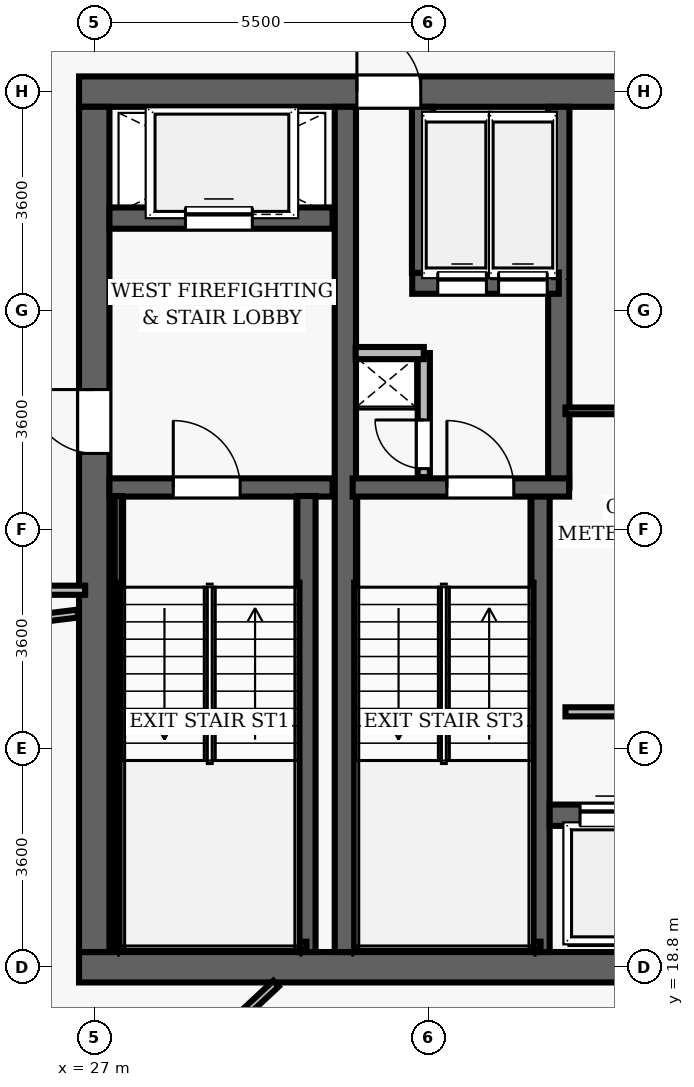
"""IFC4 building model, lengths in metres.
Left out: names, types, materials, properties, quantities, classifications, styles, units other than length and angle.
Written with IfcOpenShell. Run it as: python <this file> out.ifc"""

import sys

from ifc_helpers import new_model, si_unit, direction, frame, frame_2d, origin, place, context, subcontext, project, spatial, rectangle, extrude, element, fill, save


model = new_model("IFC4")
c1 = context("Model", 3, precision=1e-05, world=origin(), true_north=direction((0.0, 1.0)))
c2 = subcontext(c1, "Body", "Model", "MODEL_VIEW")
j1 = project(units=[si_unit("LENGTHUNIT", "METRE"), si_unit("PLANEANGLEUNIT", "RADIAN")], contexts=[c1])
p1 = place(None, origin())
s1 = spatial("IfcSite", under=j1, at=p1, CompositionType="ELEMENT")
p2 = place(p1, origin())
s2 = spatial("IfcBuilding", under=s1, at=p2, CompositionType="ELEMENT")
p3 = place(p2, frame((0.0, 0.0, 213.55)))
s3 = spatial("IfcBuildingStorey", under=s2, at=p3, CompositionType="ELEMENT", Elevation=213.55)
p4 = place(p3, frame((26.75, 18.8, 0.0), z_axis=(0.0, 0.0, 1.0), x_axis=(1.0, 0.0, 0.0)))
e1 = element("IfcWall", 1, at=p4, inside=s3, PredefinedType="SHEAR", context=c2, shape_type="SweptSolid", body=[
    extrude(rectangle(XDim=22.5, YDim=0.5, at=frame_2d((11.25, 0.0))), origin(), (0.0, 0.0, 1.0), 3.85),
])
p5 = place(p4, frame((14.47, 0.0, 0.0)))
e2 = element("IfcOpeningElement", 2, at=p5, cuts=e1, PredefinedType="OPENING", context=c2, shape_type="SweptSolid", body=[
    extrude(rectangle(XDim=1.05, YDim=2.15, at=frame_2d((0.525, 1.075))), frame((0.0, 0.26, 0.0), z_axis=(0.0, -1.0, 0.0), x_axis=(1.0, 0.0, 0.0)), (0.0, 0.0, 1.0), 0.52),
])
p6 = place(p3, frame((26.75, 33.2, 0.0), z_axis=(0.0, 0.0, 1.0), x_axis=(1.0, 0.0, 0.0)))
e3 = element("IfcWall", 3, at=p6, inside=s3, PredefinedType="SHEAR", context=c2, shape_type="SweptSolid", body=[
    extrude(rectangle(XDim=22.5, YDim=0.5, at=frame_2d((11.25, 0.0))), origin(), (0.0, 0.0, 1.0), 3.85),
])
p7 = place(p6, frame((4.57, 0.0, 0.0)))
e4 = element("IfcOpeningElement", 4, at=p7, cuts=e3, PredefinedType="OPENING", context=c2, shape_type="SweptSolid", body=[
    extrude(rectangle(XDim=1.05, YDim=2.15, at=frame_2d((0.525, 1.075))), frame((0.0, 0.26, 0.0), z_axis=(0.0, -1.0, 0.0), x_axis=(1.0, 0.0, 0.0)), (0.0, 0.0, 1.0), 0.52),
])
p8 = place(p6, frame((14.47, 0.0, 0.0)))
e5 = element("IfcOpeningElement", 5, at=p8, cuts=e3, PredefinedType="OPENING", context=c2, shape_type="SweptSolid", body=[
    extrude(rectangle(XDim=1.05, YDim=2.15, at=frame_2d((0.525, 1.075))), frame((0.0, 0.26, 0.0), z_axis=(0.0, -1.0, 0.0), x_axis=(1.0, 0.0, 0.0)), (0.0, 0.0, 1.0), 0.52),
])
p9 = place(p3, frame((27.0, 19.05, 0.0), z_axis=(0.0, 0.0, 1.0), x_axis=(0.0, 1.0, 0.0)))
e6 = element("IfcWall", 6, at=p9, inside=s3, PredefinedType="SHEAR", context=c2, shape_type="SweptSolid", body=[
    extrude(rectangle(XDim=13.9, YDim=0.5, at=frame_2d((6.95, 0.0))), origin(), (0.0, 0.0, 1.0), 3.85),
])
p10 = place(p9, frame((8.2, 0.0, 0.0)))
e7 = element("IfcOpeningElement", 7, at=p10, cuts=e6, PredefinedType="OPENING", context=c2, shape_type="SweptSolid", body=[
    extrude(rectangle(XDim=1.05, YDim=2.15, at=frame_2d((0.525, 1.075))), frame((0.0, 0.26, 0.0), z_axis=(0.0, -1.0, 0.0), x_axis=(1.0, 0.0, 0.0)), (0.0, 0.0, 1.0), 0.52),
])
p11 = place(p3, frame((31.13, 19.05, 0.0), z_axis=(0.0, 0.0, 1.0), x_axis=(0.0, 1.0, 0.0)))
e8 = element("IfcWall", 8, at=p11, inside=s3, PredefinedType="SHEAR", context=c2, shape_type="SweptSolid", body=[
    extrude(rectangle(XDim=13.9, YDim=0.35, at=frame_2d((6.95, 0.0))), origin(), (0.0, 0.0, 1.0), 3.85),
])
p12 = place(p3, frame((27.25, 26.69, 0.0), z_axis=(0.0, 0.0, 1.0), x_axis=(1.0, 0.0, 0.0)))
e9 = element("IfcWall", 9, at=p12, inside=s3, PredefinedType="SHEAR", context=c2, shape_type="SweptSolid", body=[
    extrude(rectangle(XDim=3.67, YDim=0.3, at=frame_2d((1.835, 0.0))), origin(), (0.0, 0.0, 1.0), 3.85),
])
p13 = place(p12, frame((1.05, 0.0, 0.0)))
e10 = element("IfcOpeningElement", 10, at=p13, cuts=e9, PredefinedType="OPENING", context=c2, shape_type="SweptSolid", body=[
    extrude(rectangle(XDim=1.1, YDim=2.15, at=frame_2d((0.55, 1.075))), frame((0.0, 0.16, 0.0), z_axis=(0.0, -1.0, 0.0), x_axis=(1.0, 0.0, 0.0)), (0.0, 0.0, 1.0), 0.32),
])
p14 = place(p3, frame((30.49, 19.05, 0.0), z_axis=(0.0, 0.0, 1.0), x_axis=(0.0, 1.0, 0.0)))
e11 = element("IfcWall", 11, at=p14, inside=s3, PredefinedType="SHEAR", context=c2, shape_type="SweptSolid", body=[
    extrude(rectangle(XDim=7.5, YDim=0.3, at=frame_2d((3.75, 0.0))), origin(), (0.0, 0.0, 1.0), 3.85),
])
p15 = place(p3, frame((27.395, 19.1, 0.0), z_axis=(0.0, 0.0, 1.0), x_axis=(0.0, 1.0, 0.0)))
e12 = element("IfcWall", 12, at=p15, inside=s3, PredefinedType="SHEAR", context=c2, shape_type="SweptSolid", body=[
    extrude(rectangle(XDim=7.45, YDim=0.12, at=frame_2d((3.725, 0.0))), origin(), (0.0, 0.0, 1.0), 3.85),
])
p16 = place(p3, frame((27.395, 19.16, 0.0), z_axis=(0.0, 0.0, 1.0), x_axis=(1.0, 0.0, 0.0)))
e13 = element("IfcWall", 13, at=p16, inside=s3, PredefinedType="SHEAR", context=c2, shape_type="SweptSolid", body=[
    extrude(rectangle(XDim=3.095, YDim=0.12, at=frame_2d((1.547, 0.0))), origin(), (0.0, 0.0, 1.0), 3.85),
])
p17 = place(p3, frame((27.25, 31.12, 0.0), z_axis=(0.0, 0.0, 1.0), x_axis=(1.0, 0.0, 0.0)))
e14 = element("IfcWall", 14, at=p17, inside=s3, PredefinedType="SHEAR", context=c2, shape_type="SweptSolid", body=[
    extrude(rectangle(XDim=3.67, YDim=0.35, at=frame_2d((1.835, 0.0))), origin(), (0.0, 0.0, 1.0), 3.035),
])
p18 = place(p17, frame((1.25, 0.0, 0.0)))
e15 = element("IfcOpeningElement", 15, at=p18, cuts=e14, PredefinedType="OPENING", context=c2, shape_type="SweptSolid", body=[
    extrude(rectangle(XDim=1.1, YDim=2.15, at=frame_2d((0.55, 1.075))), frame((0.0, 0.185, 0.0), z_axis=(0.0, -1.0, 0.0), x_axis=(1.0, 0.0, 0.0)), (0.0, 0.0, 1.0), 0.37),
])
p19 = place(p3, frame((34.34, 19.05, 0.0), z_axis=(0.0, 0.0, 1.0), x_axis=(0.0, 1.0, 0.0)))
e16 = element("IfcWall", 16, at=p19, inside=s3, PredefinedType="SHEAR", context=c2, shape_type="SweptSolid", body=[
    extrude(rectangle(XDim=7.5, YDim=0.3, at=frame_2d((3.75, 0.0))), origin(), (0.0, 0.0, 1.0), 3.85),
])
p20 = place(p3, frame((34.64, 26.69, 0.0), z_axis=(0.0, 0.0, 1.0), x_axis=(0.0, 1.0, 0.0)))
e17 = element("IfcWall", 17, at=p20, inside=s3, PredefinedType="SHEAR", context=c2, shape_type="SweptSolid", body=[
    extrude(rectangle(XDim=6.26, YDim=0.35, at=frame_2d((3.13, 0.0))), origin(), (0.0, 0.0, 1.0), 3.85),
])
p21 = place(p3, frame((31.25, 26.69, 0.0), z_axis=(0.0, 0.0, 1.0), x_axis=(1.0, 0.0, 0.0)))
e18 = element("IfcWall", 18, at=p21, inside=s3, PredefinedType="SHEAR", context=c2, shape_type="SweptSolid", body=[
    extrude(rectangle(XDim=3.56, YDim=0.3, at=frame_2d((1.78, 0.0))), origin(), (0.0, 0.0, 1.0), 3.85),
])
p22 = place(p21, frame((1.55, 0.0, 0.0)))
e19 = element("IfcOpeningElement", 19, at=p22, cuts=e18, PredefinedType="OPENING", context=c2, shape_type="SweptSolid", body=[
    extrude(rectangle(XDim=1.1, YDim=2.15, at=frame_2d((0.55, 1.075))), frame((0.0, 0.16, 0.0), z_axis=(0.0, -1.0, 0.0), x_axis=(1.0, 0.0, 0.0)), (0.0, 0.0, 1.0), 0.32),
])
p23 = place(p3, frame((31.3, 19.16, 0.0), z_axis=(0.0, 0.0, 1.0), x_axis=(1.0, 0.0, 0.0)))
e20 = element("IfcWall", 20, at=p23, inside=s3, PredefinedType="SHEAR", context=c2, shape_type="SweptSolid", body=[
    extrude(rectangle(XDim=3.04, YDim=0.12, at=frame_2d((1.52, 0.0))), origin(), (0.0, 0.0, 1.0), 3.85),
])
p24 = place(p3, frame((32.23, 30.05, 0.0), z_axis=(0.0, 0.0, 1.0), x_axis=(1.0, 0.0, 0.0)))
e21 = element("IfcWall", 21, at=p24, inside=s3, PredefinedType="SHEAR", context=c2, shape_type="SweptSolid", body=[
    extrude(rectangle(XDim=2.41, YDim=0.35, at=frame_2d((1.205, 0.0))), origin(), (0.0, 0.0, 1.0), 3.035),
])
p25 = place(p24, frame((0.42, 0.0, 0.0)))
e22 = element("IfcOpeningElement", 22, at=p25, cuts=e21, PredefinedType="OPENING", context=c2, shape_type="SweptSolid", body=[
    extrude(rectangle(XDim=0.8, YDim=2.15, at=frame_2d((0.4, 1.075))), frame((0.0, 0.185, 0.0), z_axis=(0.0, -1.0, 0.0), x_axis=(1.0, 0.0, 0.0)), (0.0, 0.0, 1.0), 0.37),
])
p26 = place(p24, frame((1.42, 0.0, 0.0)))
e23 = element("IfcOpeningElement", 23, at=p26, cuts=e21, PredefinedType="OPENING", context=c2, shape_type="SweptSolid", body=[
    extrude(rectangle(XDim=0.8, YDim=2.15, at=frame_2d((0.4, 1.075))), frame((0.0, 0.185, 0.0), z_axis=(0.0, -1.0, 0.0), x_axis=(1.0, 0.0, 0.0)), (0.0, 0.0, 1.0), 0.37),
])
p27 = place(p3, frame((32.4, 30.22, 0.0), z_axis=(0.0, 0.0, 1.0), x_axis=(0.0, 1.0, 0.0)))
e24 = element("IfcWall", 24, at=p27, inside=s3, PredefinedType="SHEAR", context=c2, shape_type="SweptSolid", body=[
    extrude(rectangle(XDim=2.73, YDim=0.35, at=frame_2d((1.365, 0.0))), origin(), (0.0, 0.0, 1.0), 3.035),
])
p28 = place(p3, frame((32.42, 26.86, 0.0), z_axis=(0.0, 0.0, 1.0), x_axis=(0.0, 1.0, 0.0)))
e25 = element("IfcWall", 25, at=p28, inside=s3, PredefinedType="PARTITIONING", context=c2, shape_type="SweptSolid", body=[
    extrude(rectangle(XDim=2.04, YDim=0.2, at=frame_2d((1.02, 0.0))), origin(), (0.0, 0.0, 1.0), 3.035),
])
p29 = place(p28, frame((0.14, 0.0, 0.0)))
e26 = element("IfcOpeningElement", 26, at=p29, cuts=e25, PredefinedType="OPENING", context=c2, shape_type="SweptSolid", body=[
    extrude(rectangle(XDim=0.8, YDim=2.05, at=frame_2d((0.4, 1.025))), frame((0.0, 0.11, 0.0), z_axis=(0.0, -1.0, 0.0), x_axis=(1.0, 0.0, 0.0)), (0.0, 0.0, 1.0), 0.22),
])
p30 = place(p3, frame((31.3, 28.9, 0.0), z_axis=(0.0, 0.0, 1.0), x_axis=(1.0, 0.0, 0.0)))
e27 = element("IfcWall", 27, at=p30, inside=s3, PredefinedType="PARTITIONING", context=c2, shape_type="SweptSolid", body=[
    extrude(rectangle(XDim=1.12, YDim=0.2, at=frame_2d((0.56, 0.0))), origin(), (0.0, 0.0, 1.0), 3.035),
])
p31 = place(p3, frame((34.49, 21.3, 0.0), z_axis=(0.0, 0.0, 1.0), x_axis=(1.0, 0.0, 0.0)))
e28 = element("IfcWall", 28, at=p31, inside=s3, PredefinedType="SHEAR", context=c2, shape_type="SweptSolid", body=[
    extrude(rectangle(XDim=6.68, YDim=0.35, at=frame_2d((3.34, 0.0))), origin(), (0.0, 0.0, 1.0), 3.035),
])
p32 = place(p31, frame((0.5, 0.0, 0.0)))
e29 = element("IfcOpeningElement", 29, at=p32, cuts=e28, PredefinedType="OPENING", context=c2, shape_type="SweptSolid", body=[
    extrude(rectangle(XDim=0.9, YDim=2.15, at=frame_2d((0.45, 1.075))), frame((0.0, 0.185, 0.0), z_axis=(0.0, -1.0, 0.0), x_axis=(1.0, 0.0, 0.0)), (0.0, 0.0, 1.0), 0.37),
])
p33 = place(p31, frame((2.58, 0.0, 0.0)))
e30 = element("IfcOpeningElement", 30, at=p33, cuts=e28, PredefinedType="OPENING", context=c2, shape_type="SweptSolid", body=[
    extrude(rectangle(XDim=0.9, YDim=2.15, at=frame_2d((0.45, 1.075))), frame((0.0, 0.185, 0.0), z_axis=(0.0, -1.0, 0.0), x_axis=(1.0, 0.0, 0.0)), (0.0, 0.0, 1.0), 0.37),
])
p34 = place(p31, frame((4.66, 0.0, 0.0)))
e31 = element("IfcOpeningElement", 31, at=p34, cuts=e28, PredefinedType="OPENING", context=c2, shape_type="SweptSolid", body=[
    extrude(rectangle(XDim=0.9, YDim=2.15, at=frame_2d((0.45, 1.075))), frame((0.0, 0.185, 0.0), z_axis=(0.0, -1.0, 0.0), x_axis=(1.0, 0.0, 0.0)), (0.0, 0.0, 1.0), 0.37),
])
p35 = place(p3, frame((34.75, 23.0, 0.0), z_axis=(0.0, 0.0, 1.0), x_axis=(1.0, 0.0, 0.0)))
e32 = element("IfcWall", 32, at=p35, inside=s3, PredefinedType="PARTITIONING", context=c2, shape_type="SweptSolid", body=[
    extrude(rectangle(XDim=6.25, YDim=0.15, at=frame_2d((3.125, 0.0))), origin(), (0.0, 0.0, 1.0), 3.035),
])
p36 = place(p3, frame((34.75, 27.95, 0.0), z_axis=(0.0, 0.0, 1.0), x_axis=(1.0, 0.0, 0.0)))
e33 = element("IfcWall", 33, at=p36, inside=s3, PredefinedType="PARTITIONING", context=c2, shape_type="SweptSolid", body=[
    extrude(rectangle(XDim=6.25, YDim=0.11, at=frame_2d((3.125, 0.0))), origin(), (0.0, 0.0, 1.0), 3.035),
])
p37 = place(p3, frame((16.539, 25.0, 0.0), z_axis=(0.0, 0.0, 1.0), x_axis=(1.0, 0.0, 0.0)))
e34 = element("IfcWall", 34, at=p37, inside=s3, PredefinedType="PARTITIONING", context=c2, shape_type="SweptSolid", body=[
    extrude(rectangle(XDim=10.311, YDim=0.15, at=frame_2d((5.156, 0.0))), origin(), (0.0, 0.0, 1.0), 3.035),
])
p38 = place(p3, frame((26.73, 24.616, 0.0), z_axis=(0.0, 0.0, 1.0), x_axis=(-0.992544457944, -0.121883136673, 0.0)))
e35 = element("IfcWall", 35, at=p38, inside=s3, PredefinedType="PARTITIONING", context=c2, shape_type="SweptSolid", body=[
    extrude(rectangle(XDim=11.886, YDim=0.13, at=frame_2d((5.943, 0.0))), origin(), (0.0, 0.0, 1.0), 3.035),
])
p39 = place(p3, frame((29.99, 18.53, 0.0), z_axis=(0.0, 0.0, 1.0), x_axis=(-0.731364385801, -0.6819869025, 0.0)))
e36 = element("IfcWall", 36, at=p39, inside=s3, PredefinedType="PARTITIONING", context=c2, shape_type="SweptSolid", body=[
    extrude(rectangle(XDim=9.636, YDim=0.13, at=frame_2d((4.818, 0.0))), origin(), (0.0, 0.0, 1.0), 3.035),
])
p40 = place(p3, frame((36.548, 18.53, 0.0), z_axis=(0.0, 0.0, 1.0), x_axis=(-0.190822813374, -0.9816244974, 0.0)))
e37 = element("IfcWall", 37, at=p40, inside=s3, PredefinedType="PARTITIONING", context=c2, shape_type="SweptSolid", body=[
    extrude(rectangle(XDim=14.368, YDim=0.13, at=frame_2d((7.184, 0.0))), origin(), (0.0, 0.0, 1.0), 3.035),
])
p41 = place(p13, origin())
e38 = element("IfcDoor", 38, at=p41, inside=s3, OperationType="SINGLE_SWING_LEFT", PredefinedType="DOOR", context=c2, shape_type="SweptSolid", body=[
    extrude(rectangle(XDim=1.1, YDim=2.15, at=frame_2d((0.55, 1.075))), frame((0.0, 0.025, 0.0), z_axis=(0.0, -1.0, 0.0), x_axis=(1.0, 0.0, 0.0)), (0.0, 0.0, 1.0), 0.05),
])
fill(e10, e38)
p42 = place(p10, origin())
e39 = element("IfcDoor", 39, at=p42, inside=s3, OperationType="SINGLE_SWING_RIGHT", PredefinedType="DOOR", context=c2, shape_type="SweptSolid", body=[
    extrude(rectangle(XDim=1.05, YDim=2.15, at=frame_2d((0.525, 1.075))), frame((0.0, 0.025, 0.0), z_axis=(0.0, -1.0, 0.0), x_axis=(1.0, 0.0, 0.0)), (0.0, 0.0, 1.0), 0.05),
])
fill(e7, e39)
p43 = place(p22, origin())
e40 = element("IfcDoor", 40, at=p43, inside=s3, OperationType="SINGLE_SWING_LEFT", PredefinedType="DOOR", context=c2, shape_type="SweptSolid", body=[
    extrude(rectangle(XDim=1.1, YDim=2.15, at=frame_2d((0.55, 1.075))), frame((0.0, 0.025, 0.0), z_axis=(0.0, -1.0, 0.0), x_axis=(1.0, 0.0, 0.0)), (0.0, 0.0, 1.0), 0.05),
])
fill(e19, e40)
p44 = place(p29, origin())
e41 = element("IfcDoor", 41, at=p44, inside=s3, OperationType="SINGLE_SWING_RIGHT", PredefinedType="DOOR", context=c2, shape_type="SweptSolid", body=[
    extrude(rectangle(XDim=0.8, YDim=2.05, at=frame_2d((0.4, 1.025))), frame((0.0, 0.025, 0.0), z_axis=(0.0, -1.0, 0.0), x_axis=(1.0, 0.0, 0.0)), (0.0, 0.0, 1.0), 0.05),
])
fill(e26, e41)
p45 = place(p7, origin())
e42 = element("IfcDoor", 42, at=p45, inside=s3, OperationType="SINGLE_SWING_LEFT", PredefinedType="DOOR", context=c2, shape_type="SweptSolid", body=[
    extrude(rectangle(XDim=1.05, YDim=2.15, at=frame_2d((0.525, 1.075))), frame((0.0, 0.025, 0.0), z_axis=(0.0, -1.0, 0.0), x_axis=(1.0, 0.0, 0.0)), (0.0, 0.0, 1.0), 0.05),
])
fill(e4, e42)
p46 = place(p32, origin())
e43 = element("IfcDoor", 43, at=p46, inside=s3, OperationType="SLIDING_TO_LEFT", PredefinedType="DOOR", context=c2, shape_type="SweptSolid", body=[
    extrude(rectangle(XDim=0.9, YDim=2.15, at=frame_2d((0.45, 1.075))), frame((0.0, 0.025, 0.0), z_axis=(0.0, -1.0, 0.0), x_axis=(1.0, 0.0, 0.0)), (0.0, 0.0, 1.0), 0.05),
])
fill(e29, e43)
p47 = place(p18, origin())
e44 = element("IfcDoor", 44, at=p47, inside=s3, OperationType="SLIDING_TO_LEFT", PredefinedType="DOOR", context=c2, shape_type="SweptSolid", body=[
    extrude(rectangle(XDim=1.1, YDim=2.15, at=frame_2d((0.55, 1.075))), frame((0.0, 0.025, 0.0), z_axis=(0.0, -1.0, 0.0), x_axis=(1.0, 0.0, 0.0)), (0.0, 0.0, 1.0), 0.05),
])
fill(e15, e44)
p48 = place(p25, origin())
e45 = element("IfcDoor", 45, at=p48, inside=s3, OperationType="SLIDING_TO_LEFT", PredefinedType="DOOR", context=c2, shape_type="SweptSolid", body=[
    extrude(rectangle(XDim=0.8, YDim=2.15, at=frame_2d((0.4, 1.075))), frame((0.0, 0.025, 0.0), z_axis=(0.0, -1.0, 0.0), x_axis=(1.0, 0.0, 0.0)), (0.0, 0.0, 1.0), 0.05),
])
fill(e22, e45)
p49 = place(p26, origin())
e46 = element("IfcDoor", 46, at=p49, inside=s3, OperationType="SLIDING_TO_LEFT", PredefinedType="DOOR", context=c2, shape_type="SweptSolid", body=[
    extrude(rectangle(XDim=0.8, YDim=2.15, at=frame_2d((0.4, 1.075))), frame((0.0, 0.025, 0.0), z_axis=(0.0, -1.0, 0.0), x_axis=(1.0, 0.0, 0.0)), (0.0, 0.0, 1.0), 0.05),
])
fill(e23, e46)
save(model, sys.argv[1])
